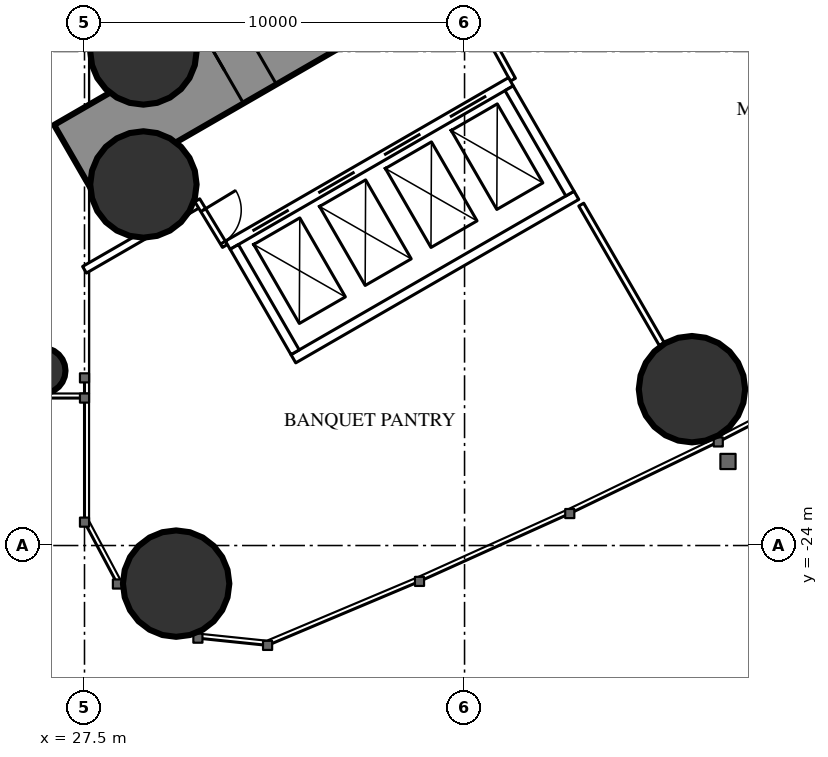
"""IFC4 building model, lengths in metres.
Left out: names, types, materials, properties, quantities, classifications, styles, units other than length and angle.
Written with IfcOpenShell. Run it as: python <this file> out.ifc"""

import sys

from ifc_helpers import new_model, si_unit, direction, frame, frame_2d, origin, origin_2d, place, context, subcontext, project, spatial, rectangle, circle, hollow_circle, extrude, element, fill, save


model = new_model("IFC4")
c1 = context("Model", 3, precision=1e-05, world=origin(), true_north=direction((0.0, 1.0)))
c2 = subcontext(c1, "Body", "Model", "MODEL_VIEW")
j1 = project(units=[si_unit("LENGTHUNIT", "METRE"), si_unit("PLANEANGLEUNIT", "RADIAN")], contexts=[c1])
p1 = place(None, origin())
s1 = spatial("IfcSite", under=j1, at=p1, CompositionType="ELEMENT")
p2 = place(p1, origin())
s2 = spatial("IfcBuilding", under=s1, at=p2, CompositionType="ELEMENT")
p3 = place(p2, frame((0.0, 0.0, 7.2)))
s3 = spatial("IfcBuildingStorey", under=s2, at=p3, CompositionType="ELEMENT", Elevation=7.2)
for number, where, z_axis, x_axis in (
    (1, (29.911, -25.002, 0.0), (0.0, 0.0, 1.0), (1.0, 0.0, 0.0)),
    (2, (29.05, -11.0, 0.0), (0.0, 0.0, 1.0), (1.0, 0.0, 0.0)),
    (3, (29.05, -14.5, 0.0), (0.0, 0.0, 1.0), (1.0, 0.0, 0.0)),
    (4, (43.484, -19.886, 0.0), (0.0, 0.0, 1.0), (1.0, 0.0, 0.0)),
):
    element("IfcColumn", number, at=place(p3, frame(where, z_axis=z_axis, x_axis=x_axis)), inside=s3, PredefinedType="COLUMN", context=c2, shape_type="SweptSolid", body=[
        extrude(hollow_circle(Radius=1.4, WallThickness=0.12, at=origin_2d()), origin(), (0.0, 0.0, 1.0), 5.4),
    ])
p4 = place(p3, frame((27.2, -13.8, 0.0), z_axis=(0.0, 0.0, 1.0), x_axis=(0.866027159892, 0.499996958321, 0.0)))
e5 = element("IfcWall", 5, at=p4, inside=s3, PredefinedType="SHEAR", context=c2, shape_type="SweptSolid", body=[
    extrude(rectangle(XDim=27.947, YDim=2.0, at=frame_2d((13.973, 0.0))), origin(), (0.0, 0.0, 1.0), 5.4),
])
p5 = place(p4, frame((4.6, 0.0, 0.0)))
e6 = element("IfcOpeningElement", 6, at=p5, cuts=e5, PredefinedType="OPENING", context=c2, shape_type="SweptSolid", body=[
    extrude(rectangle(XDim=1.0, YDim=2.2, at=frame_2d((0.5, 1.1))), frame((0.0, 1.01, 0.0), z_axis=(0.0, -1.0, 0.0), x_axis=(1.0, 0.0, 0.0)), (0.0, 0.0, 1.0), 2.02),
])
p6 = place(p4, frame((13.395, 0.0, 0.0)))
e7 = element("IfcOpeningElement", 7, at=p6, cuts=e5, PredefinedType="OPENING", context=c2, shape_type="SweptSolid", body=[
    extrude(rectangle(XDim=1.8, YDim=2.2, at=frame_2d((0.9, 1.1))), frame((0.0, 1.01, 0.0), z_axis=(0.0, -1.0, 0.0), x_axis=(1.0, 0.0, 0.0)), (0.0, 0.0, 1.0), 2.02),
])
p7 = place(p3, frame((26.4, -19.4, 0.0), z_axis=(0.0, 0.0, 1.0), x_axis=(1.0, 0.0, 0.0)))
e8 = element("IfcColumn", 8, at=p7, inside=s3, PredefinedType="COLUMN", context=c2, shape_type="SweptSolid", body=[
    extrude(circle(Radius=0.6, at=origin_2d()), origin(), (0.0, 0.0, 1.0), 5.4),
])
p8 = place(p3, frame((40.57, -15.03, 0.0), z_axis=(0.0, 0.0, 1.0), x_axis=(0.500012993597, -0.866017901798, 0.0)))
e9 = element("IfcWall", 9, at=p8, inside=s3, PredefinedType="PARTITIONING", context=c2, shape_type="SweptSolid", body=[
    extrude(rectangle(XDim=4.243, YDim=0.15, at=frame_2d((2.122, 0.0))), origin(), (0.0, 0.0, 1.0), 5.05),
])
p9 = place(p3, frame((27.5, -16.744, 0.0), z_axis=(0.0, 0.0, 1.0), x_axis=(0.866034395887, 0.499984424899, 0.0)))
e10 = element("IfcWall", 10, at=p9, inside=s3, PredefinedType="PARTITIONING", context=c2, shape_type="SweptSolid", body=[
    extrude(rectangle(XDim=3.469, YDim=0.2, at=frame_2d((1.734, 0.0))), origin(), (0.0, 0.0, 1.0), 5.05),
])
p10 = place(p3, frame((30.467, -14.916, 0.0), z_axis=(0.0, 0.0, 1.0), x_axis=(0.518297865337, -0.855200165334, 0.0)))
e11 = element("IfcWall", 11, at=p10, inside=s3, PredefinedType="PARTITIONING", context=c2, shape_type="SweptSolid", body=[
    extrude(rectangle(XDim=1.405, YDim=0.15, at=frame_2d((0.703, 0.0))), origin(), (0.0, 0.0, 1.0), 5.05),
])
p11 = place(p10, frame((0.303, 0.0, 0.0)))
e12 = element("IfcOpeningElement", 12, at=p11, cuts=e11, PredefinedType="OPENING", context=c2, shape_type="SweptSolid", body=[
    extrude(rectangle(XDim=1.0, YDim=2.2, at=frame_2d((0.5, 1.1))), frame((0.0, 0.085, 0.0), z_axis=(0.0, -1.0, 0.0), x_axis=(1.0, 0.0, 0.0)), (0.0, 0.0, 1.0), 0.17),
])
p12 = place(p3, frame((38.773, -11.742, 0.0), z_axis=(0.0, 0.0, 1.0), x_axis=(-0.481418475768, 0.876490873421, 0.0)))
e13 = element("IfcWall", 13, at=p12, inside=s3, PredefinedType="PARTITIONING", context=c2, shape_type="SweptSolid", body=[
    extrude(rectangle(XDim=1.405, YDim=0.15, at=frame_2d((0.703, 0.0))), origin(), (0.0, 0.0, 1.0), 5.05),
])
p13 = place(p3, frame((31.271, -16.097, 0.0), z_axis=(0.0, 0.0, 1.0), x_axis=(0.86604045752, 0.499973925258, 0.0)))
e14 = element("IfcWall", 14, at=p13, inside=s3, PredefinedType="PARTITIONING", context=c2, shape_type="SweptSolid", body=[
    extrude(rectangle(XDim=8.6, YDim=0.25, at=frame_2d((4.3, 0.0))), origin(), (0.0, 0.0, 1.0), 5.05),
])
p14 = place(p13, frame((0.75, 0.0, 0.0)))
e15 = element("IfcOpeningElement", 15, at=p14, cuts=e14, PredefinedType="OPENING", context=c2, shape_type="SweptSolid", body=[
    extrude(rectangle(XDim=1.1, YDim=2.2, at=frame_2d((0.55, 1.1))), frame((0.0, 0.135, 0.0), z_axis=(0.0, -1.0, 0.0), x_axis=(1.0, 0.0, 0.0)), (0.0, 0.0, 1.0), 0.27),
])
p15 = place(p13, frame((2.75, 0.0, 0.0)))
e16 = element("IfcOpeningElement", 16, at=p15, cuts=e14, PredefinedType="OPENING", context=c2, shape_type="SweptSolid", body=[
    extrude(rectangle(XDim=1.1, YDim=2.2, at=frame_2d((0.55, 1.1))), frame((0.0, 0.135, 0.0), z_axis=(0.0, -1.0, 0.0), x_axis=(1.0, 0.0, 0.0)), (0.0, 0.0, 1.0), 0.27),
])
p16 = place(p13, frame((4.75, 0.0, 0.0)))
e17 = element("IfcOpeningElement", 17, at=p16, cuts=e14, PredefinedType="OPENING", context=c2, shape_type="SweptSolid", body=[
    extrude(rectangle(XDim=1.1, YDim=2.2, at=frame_2d((0.55, 1.1))), frame((0.0, 0.135, 0.0), z_axis=(0.0, -1.0, 0.0), x_axis=(1.0, 0.0, 0.0)), (0.0, 0.0, 1.0), 0.27),
])
p17 = place(p13, frame((6.75, 0.0, 0.0)))
e18 = element("IfcOpeningElement", 18, at=p17, cuts=e14, PredefinedType="OPENING", context=c2, shape_type="SweptSolid", body=[
    extrude(rectangle(XDim=1.1, YDim=2.2, at=frame_2d((0.55, 1.1))), frame((0.0, 0.135, 0.0), z_axis=(0.0, -1.0, 0.0), x_axis=(1.0, 0.0, 0.0)), (0.0, 0.0, 1.0), 0.27),
])
p18 = place(p3, frame((32.996, -19.086, 0.0), z_axis=(0.0, 0.0, 1.0), x_axis=(0.866028165386, 0.499995216735, 0.0)))
e19 = element("IfcWall", 19, at=p18, inside=s3, PredefinedType="PARTITIONING", context=c2, shape_type="SweptSolid", body=[
    extrude(rectangle(XDim=8.6, YDim=0.25, at=frame_2d((4.3, 0.0))), origin(), (0.0, 0.0, 1.0), 5.05),
])
for number, where, z_axis, x_axis in (
    (20, (31.441, -16.143, 0.0), (0.0, 0.0, 1.0), (0.5, -0.866, 0.0)),
    (21, (38.673, -11.968, 0.0), (0.0, 0.0, 1.0), (0.5, -0.866, 0.0)),
):
    element("IfcWall", number, at=place(p3, frame(where, z_axis=z_axis, x_axis=x_axis)), inside=s3, PredefinedType="PARTITIONING", context=c2, shape_type="SweptSolid", body=[
        extrude(rectangle(XDim=3.201, YDim=0.25, at=frame_2d((1.6, 0.0))), origin(), (0.0, 0.0, 1.0), 5.05),
    ])
p19 = place(p11, origin())
e22 = element("IfcDoor", 22, at=p19, inside=s3, OperationType="SINGLE_SWING_LEFT", PredefinedType="DOOR", context=c2, shape_type="SweptSolid", body=[
    extrude(rectangle(XDim=1.0, YDim=2.2, at=frame_2d((0.5, 1.1))), frame((0.0, 0.025, 0.0), z_axis=(0.0, -1.0, 0.0), x_axis=(1.0, 0.0, 0.0)), (0.0, 0.0, 1.0), 0.05),
])
fill(e12, e22)
p20 = place(p5, origin())
e23 = element("IfcDoor", 23, at=p20, inside=s3, OperationType="SINGLE_SWING_LEFT", PredefinedType="DOOR", context=c2, shape_type="SweptSolid", body=[
    extrude(rectangle(XDim=1.0, YDim=2.2, at=frame_2d((0.5, 1.1))), frame((0.0, 0.025, 0.0), z_axis=(0.0, -1.0, 0.0), x_axis=(1.0, 0.0, 0.0)), (0.0, 0.0, 1.0), 0.05),
])
fill(e6, e23)
p21 = place(p14, origin())
e24 = element("IfcDoor", 24, at=p21, inside=s3, OperationType="DOUBLE_DOOR_SLIDING", PredefinedType="USERDEFINED", context=c2, shape_type="SweptSolid", body=[
    extrude(rectangle(XDim=1.1, YDim=2.2, at=frame_2d((0.55, 1.1))), frame((0.0, 0.025, 0.0), z_axis=(0.0, -1.0, 0.0), x_axis=(1.0, 0.0, 0.0)), (0.0, 0.0, 1.0), 0.05),
])
fill(e15, e24)
p22 = place(p15, origin())
e25 = element("IfcDoor", 25, at=p22, inside=s3, OperationType="DOUBLE_DOOR_SLIDING", PredefinedType="USERDEFINED", context=c2, shape_type="SweptSolid", body=[
    extrude(rectangle(XDim=1.1, YDim=2.2, at=frame_2d((0.55, 1.1))), frame((0.0, 0.025, 0.0), z_axis=(0.0, -1.0, 0.0), x_axis=(1.0, 0.0, 0.0)), (0.0, 0.0, 1.0), 0.05),
])
fill(e16, e25)
p23 = place(p16, origin())
e26 = element("IfcDoor", 26, at=p23, inside=s3, OperationType="DOUBLE_DOOR_SLIDING", PredefinedType="USERDEFINED", context=c2, shape_type="SweptSolid", body=[
    extrude(rectangle(XDim=1.1, YDim=2.2, at=frame_2d((0.55, 1.1))), frame((0.0, 0.025, 0.0), z_axis=(0.0, -1.0, 0.0), x_axis=(1.0, 0.0, 0.0)), (0.0, 0.0, 1.0), 0.05),
])
fill(e17, e26)
p24 = place(p17, origin())
e27 = element("IfcDoor", 27, at=p24, inside=s3, OperationType="DOUBLE_DOOR_SLIDING", PredefinedType="USERDEFINED", context=c2, shape_type="SweptSolid", body=[
    extrude(rectangle(XDim=1.1, YDim=2.2, at=frame_2d((0.55, 1.1))), frame((0.0, 0.025, 0.0), z_axis=(0.0, -1.0, 0.0), x_axis=(1.0, 0.0, 0.0)), (0.0, 0.0, 1.0), 0.05),
])
fill(e18, e27)
save(model, sys.argv[1])
